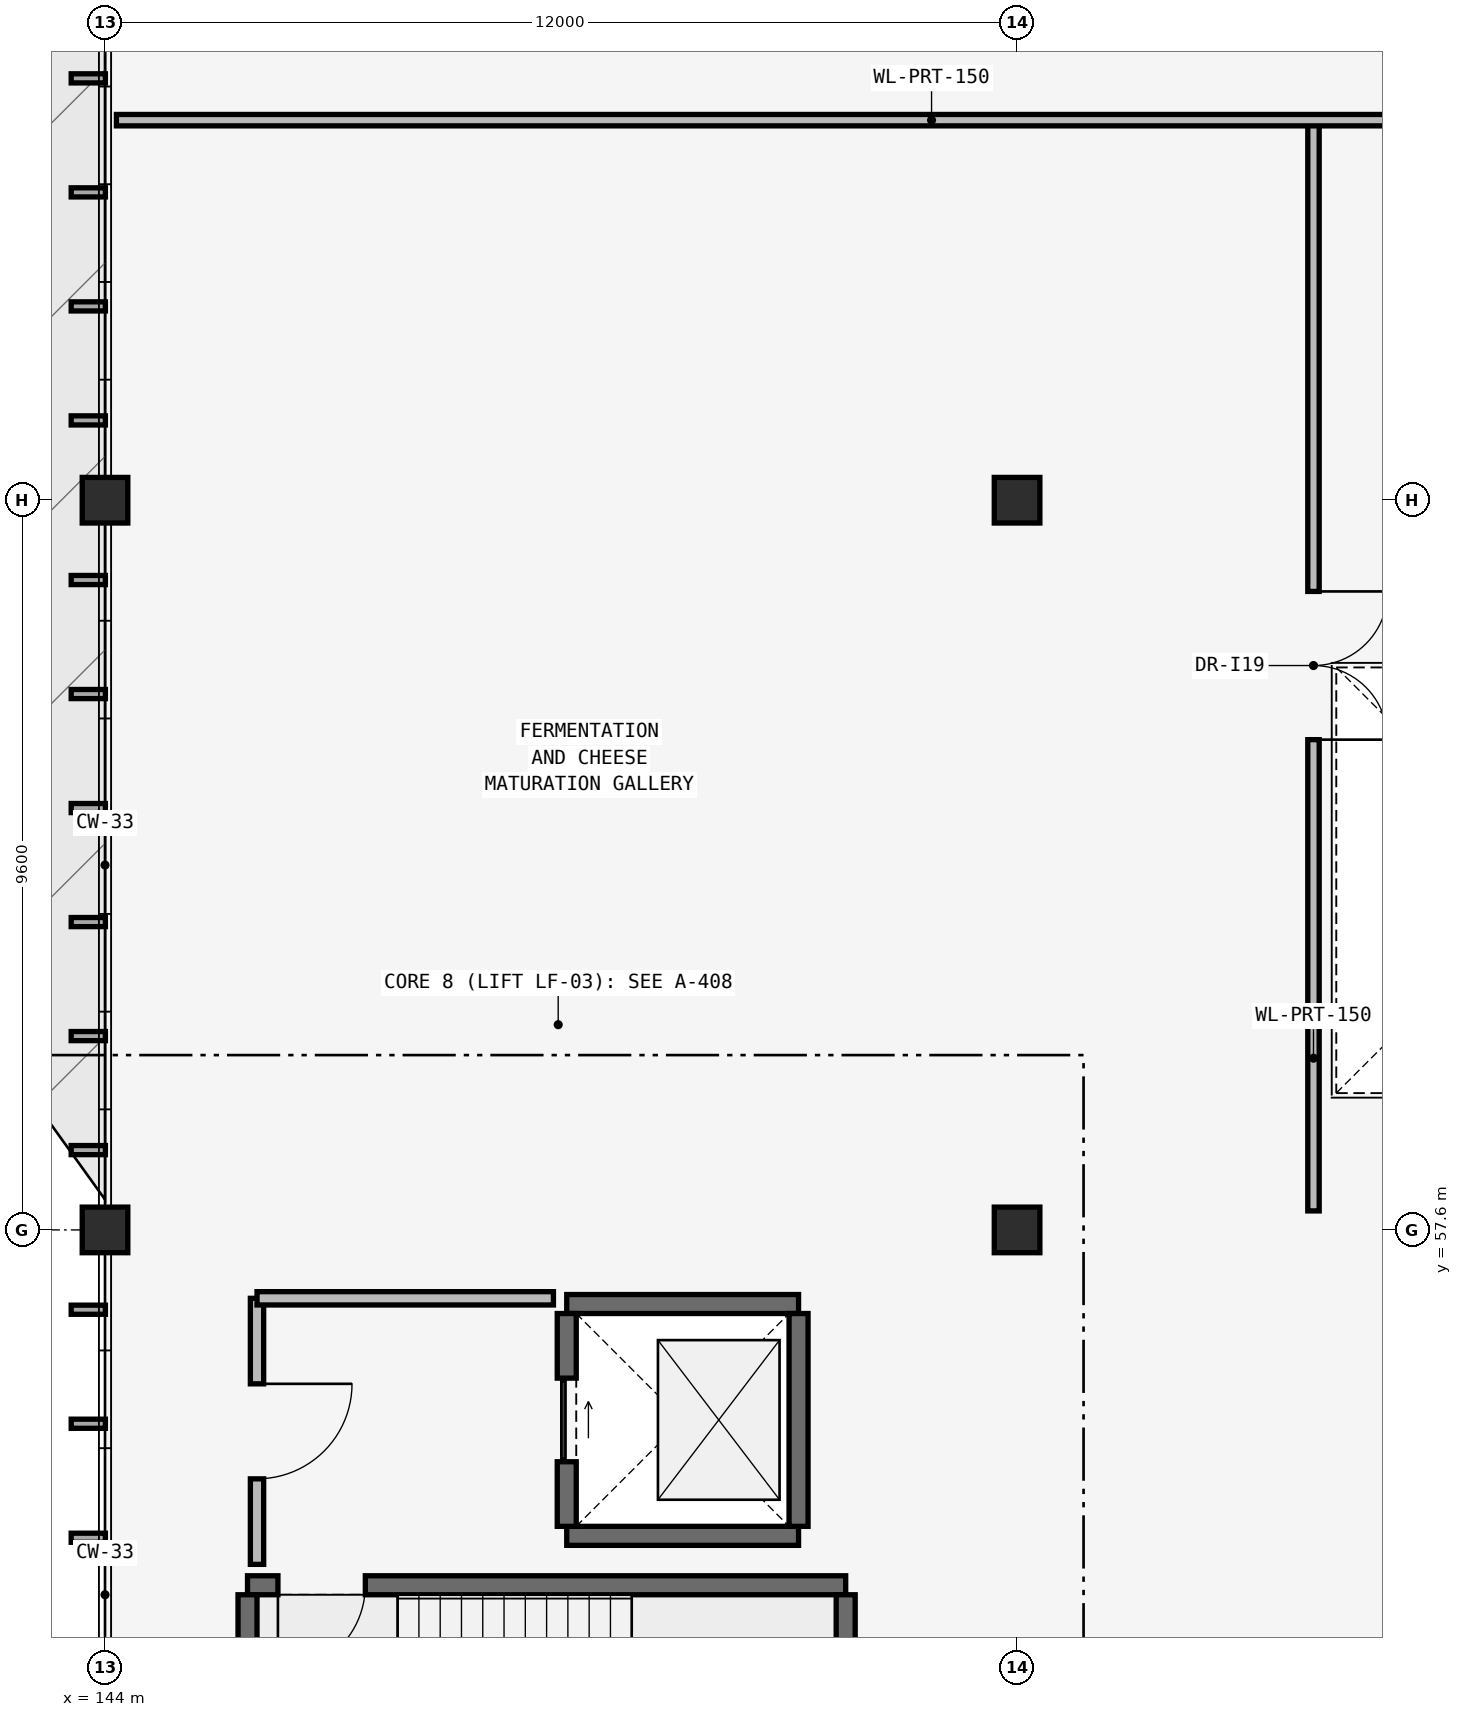
"""IFC4 building model, lengths in metres.
Left out: names, types, materials, properties, quantities, classifications, styles, units other than length and angle.
Written with IfcOpenShell. Run it as: python <this file> out.ifc"""

import sys

from ifc_helpers import new_model, si_unit, direction, frame, frame_2d, origin, origin_2d, place, context, subcontext, project, spatial, rectangle, extrude, element, fill, save


model = new_model("IFC4")
c1 = context("Model", 3, precision=1e-05, world=origin(), true_north=direction((0.0, 1.0)))
c2 = subcontext(c1, "Body", "Model", "MODEL_VIEW")
j1 = project(units=[si_unit("LENGTHUNIT", "METRE"), si_unit("PLANEANGLEUNIT", "RADIAN")], contexts=[c1])
p1 = place(None, origin())
s1 = spatial("IfcSite", under=j1, at=p1, CompositionType="ELEMENT")
p2 = place(p1, origin())
s2 = spatial("IfcBuilding", under=s1, at=p2, CompositionType="ELEMENT")
p3 = place(p2, frame((0.0, 0.0, 10.2)))
s3 = spatial("IfcBuildingStorey", under=s2, at=p3, CompositionType="ELEMENT", Elevation=10.2)
for number, where, z_axis, x_axis in (
    (1, (144.0, 57.6, 0.0), (0.0, 0.0, 1.0), (1.0, 0.0, 0.0)),
    (2, (144.0, 67.2, 0.0), (0.0, 0.0, 1.0), (1.0, 0.0, 0.0)),
    (3, (156.0, 57.6, 0.0), (0.0, 0.0, 1.0), (1.0, 0.0, 0.0)),
    (4, (156.0, 67.2, 0.0), (0.0, 0.0, 1.0), (1.0, 0.0, 0.0)),
):
    element("IfcColumn", number, at=place(p3, frame(where, z_axis=z_axis, x_axis=x_axis)), inside=s3, PredefinedType="COLUMN", context=c2, shape_type="SweptSolid", body=[
        extrude(rectangle(XDim=0.6, YDim=0.6, at=origin_2d()), origin(), (0.0, 0.0, 1.0), 4.2),
    ])
p4 = place(p3, frame((145.875, 52.925, 0.0), z_axis=(0.0, 0.0, 1.0), x_axis=(1.0, 0.0, 0.0)))
e5 = element("IfcWall", 5, at=p4, inside=s3, PredefinedType="SHEAR", context=c2, shape_type="SweptSolid", body=[
    extrude(rectangle(XDim=7.87, YDim=0.25, at=frame_2d((3.935, 0.0))), origin(), (0.0, 0.0, 1.0), 3.94),
])
p5 = place(p4, frame((0.4, 0.0, 0.0)))
e6 = element("IfcOpeningElement", 6, at=p5, cuts=e5, PredefinedType="OPENING", context=c2, shape_type="SweptSolid", body=[
    extrude(rectangle(XDim=1.15, YDim=2.15, at=frame_2d((0.575, 1.075))), frame((0.0, 0.14, 0.0), z_axis=(0.0, -1.0, 0.0), x_axis=(1.0, 0.0, 0.0)), (0.0, 0.0, 1.0), 0.28),
])
for number, where, z_axis, x_axis in (
    (7, (145.875, 48.9, 0.0), (0.0, 0.0, 1.0), (0.0, 1.0, 0.0)),
    (8, (153.745, 48.9, 0.0), (0.0, 0.0, 1.0), (0.0, 1.0, 0.0)),
):
    element("IfcWall", number, at=place(p3, frame(where, z_axis=z_axis, x_axis=x_axis)), inside=s3, PredefinedType="SHEAR", context=c2, shape_type="SweptSolid", body=[
        extrude(rectangle(XDim=3.9, YDim=0.25, at=frame_2d((1.95, 0.0))), origin(), (0.0, 0.0, 1.0), 3.94),
    ])
for number, where, z_axis, x_axis in (
    (9, (150.075, 53.575, 0.0), (0.0, 0.0, 1.0), (1.0, 0.0, 0.0)),
    (10, (150.075, 56.625, 0.0), (0.0, 0.0, 1.0), (1.0, 0.0, 0.0)),
):
    element("IfcWall", number, at=place(p3, frame(where, z_axis=z_axis, x_axis=x_axis)), inside=s3, PredefinedType="SHEAR", context=c2, shape_type="SweptSolid", body=[
        extrude(rectangle(XDim=3.05, YDim=0.25, at=frame_2d((1.525, 0.0))), origin(), (0.0, 0.0, 1.0), 3.94),
    ])
p6 = place(p3, frame((153.125, 53.7, 0.0), z_axis=(0.0, 0.0, 1.0), x_axis=(0.0, 1.0, 0.0)))
e11 = element("IfcWall", 11, at=p6, inside=s3, PredefinedType="SHEAR", context=c2, shape_type="SweptSolid", body=[
    extrude(rectangle(XDim=2.8, YDim=0.25, at=frame_2d((1.4, 0.0))), origin(), (0.0, 0.0, 1.0), 3.94),
])
p7 = place(p3, frame((150.075, 53.7, 0.0), z_axis=(0.0, 0.0, 1.0), x_axis=(0.0, 1.0, 0.0)))
e12 = element("IfcWall", 12, at=p7, inside=s3, PredefinedType="SHEAR", context=c2, shape_type="SweptSolid", body=[
    extrude(rectangle(XDim=2.8, YDim=0.25, at=frame_2d((1.4, 0.0))), origin(), (0.0, 0.0, 1.0), 3.94),
])
p8 = place(p7, frame((0.85, 0.0, 0.0)))
e13 = element("IfcOpeningElement", 13, at=p8, cuts=e12, PredefinedType="OPENING", context=c2, shape_type="SweptSolid", body=[
    extrude(rectangle(XDim=1.1, YDim=2.15, at=frame_2d((0.55, 1.075))), frame((0.0, 0.14, 0.0), z_axis=(0.0, -1.0, 0.0), x_axis=(1.0, 0.0, 0.0)), (0.0, 0.0, 1.0), 0.28),
])
p9 = place(p3, frame((146.0, 53.2, 0.0), z_axis=(0.0, 0.0, 1.0), x_axis=(0.0, 1.0, 0.0)))
e14 = element("IfcWall", 14, at=p9, inside=s3, PredefinedType="PARTITIONING", context=c2, shape_type="SweptSolid", body=[
    extrude(rectangle(XDim=3.5, YDim=0.175, at=frame_2d((1.75, 0.0))), origin(), (0.0, 0.0, 1.0), 3.94),
])
p10 = place(p9, frame((1.125, 0.0, 0.0)))
e15 = element("IfcOpeningElement", 15, at=p10, cuts=e14, PredefinedType="OPENING", context=c2, shape_type="SweptSolid", body=[
    extrude(rectangle(XDim=1.25, YDim=2.2, at=frame_2d((0.625, 1.1))), frame((0.0, 0.103, 0.0), z_axis=(0.0, -1.0, 0.0), x_axis=(1.0, 0.0, 0.0)), (0.0, 0.0, 1.0), 0.205),
])
p11 = place(p3, frame((146.0, 56.7, 0.0), z_axis=(0.0, 0.0, 1.0), x_axis=(1.0, 0.0, 0.0)))
e16 = element("IfcWall", 16, at=p11, inside=s3, PredefinedType="PARTITIONING", context=c2, shape_type="SweptSolid", body=[
    extrude(rectangle(XDim=3.9, YDim=0.175, at=frame_2d((1.95, 0.0))), origin(), (0.0, 0.0, 1.0), 3.94),
])
p12 = place(p3, frame((159.9, 57.85, 0.0), z_axis=(0.0, 0.0, 1.0), x_axis=(0.0, 1.0, 0.0)))
e17 = element("IfcWall", 17, at=p12, inside=s3, PredefinedType="PARTITIONING", context=c2, shape_type="SweptSolid", body=[
    extrude(rectangle(XDim=14.35, YDim=0.15, at=frame_2d((7.175, 0.0))), origin(), (0.0, 0.0, 1.0), 3.94),
])
p13 = place(p12, frame((6.2, 0.0, 0.0)))
e18 = element("IfcOpeningElement", 18, at=p13, cuts=e17, PredefinedType="OPENING", context=c2, shape_type="SweptSolid", body=[
    extrude(rectangle(XDim=1.95, YDim=2.32, at=frame_2d((0.975, 1.16))), frame((0.0, 0.09, 0.0), z_axis=(0.0, -1.0, 0.0), x_axis=(1.0, 0.0, 0.0)), (0.0, 0.0, 1.0), 0.18),
])
p14 = place(p3, frame((144.15, 72.2, 0.0), z_axis=(0.0, 0.0, 1.0), x_axis=(1.0, 0.0, 0.0)))
e19 = element("IfcWall", 19, at=p14, inside=s3, PredefinedType="PARTITIONING", context=c2, shape_type="SweptSolid", body=[
    extrude(rectangle(XDim=21.45, YDim=0.15, at=frame_2d((10.725, 0.0))), origin(), (0.0, 0.0, 1.0), 3.94),
])
p15 = place(p5, frame((1.15, 0.0, 0.0), z_axis=(0.0, 0.0, 1.0), x_axis=(-1.0, 0.0, 0.0)))
e20 = element("IfcDoor", 20, at=p15, inside=s3, OperationType="SINGLE_SWING_LEFT", PredefinedType="DOOR", context=c2, shape_type="SweptSolid", body=[
    extrude(rectangle(XDim=1.15, YDim=2.15, at=frame_2d((0.575, 1.075))), frame((0.0, 0.025, 0.0), z_axis=(0.0, -1.0, 0.0), x_axis=(1.0, 0.0, 0.0)), (0.0, 0.0, 1.0), 0.05),
])
fill(e6, e20)
p16 = place(p8, origin())
e21 = element("IfcDoor", 21, at=p16, inside=s3, OperationType="SLIDING_TO_LEFT", PredefinedType="DOOR", context=c2, shape_type="SweptSolid", body=[
    extrude(rectangle(XDim=1.1, YDim=2.15, at=frame_2d((0.55, 1.075))), frame((0.0, 0.025, 0.0), z_axis=(0.0, -1.0, 0.0), x_axis=(1.0, 0.0, 0.0)), (0.0, 0.0, 1.0), 0.05),
])
fill(e13, e21)
p17 = place(p10, frame((1.25, 0.0, 0.0), z_axis=(0.0, 0.0, 1.0), x_axis=(-1.0, 0.0, 0.0)))
e22 = element("IfcDoor", 22, at=p17, inside=s3, OperationType="SINGLE_SWING_RIGHT", PredefinedType="DOOR", context=c2, shape_type="SweptSolid", body=[
    extrude(rectangle(XDim=1.25, YDim=2.2, at=frame_2d((0.625, 1.1))), frame((0.0, 0.025, 0.0), z_axis=(0.0, -1.0, 0.0), x_axis=(1.0, 0.0, 0.0)), (0.0, 0.0, 1.0), 0.05),
])
fill(e15, e22)
p18 = place(p13, origin())
e23 = element("IfcDoor", 23, at=p18, inside=s3, OperationType="DOUBLE_DOOR_SINGLE_SWING", PredefinedType="DOOR", context=c2, shape_type="SweptSolid", body=[
    extrude(rectangle(XDim=1.95, YDim=2.32, at=frame_2d((0.975, 1.16))), frame((0.0, 0.025, 0.0), z_axis=(0.0, -1.0, 0.0), x_axis=(1.0, 0.0, 0.0)), (0.0, 0.0, 1.0), 0.05),
])
fill(e18, e23)
save(model, sys.argv[1])
